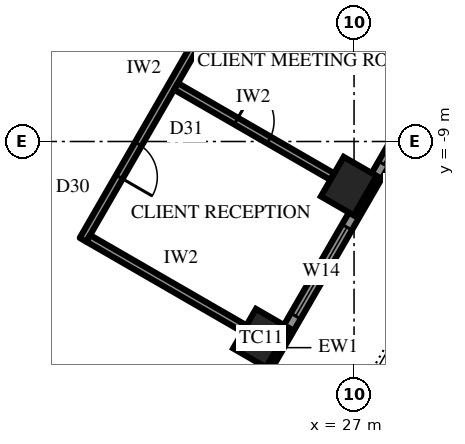
"""IFC4 building model, lengths in metres.
Left out: names, types, materials, properties, quantities, classifications, styles, units other than length and angle.
Written with IfcOpenShell. Run it as: python <this file> out.ifc"""

import sys

from ifc_helpers import new_model, si_unit, direction, frame, frame_2d, origin, origin_2d, place, context, subcontext, project, spatial, rectangle, extrude, element, fill, save


model = new_model("IFC4")
c1 = context("Model", 3, precision=1e-05, world=origin(), true_north=direction((0.0, 1.0)))
c2 = subcontext(c1, "Body", "Model", "MODEL_VIEW")
j1 = project(units=[si_unit("LENGTHUNIT", "METRE"), si_unit("PLANEANGLEUNIT", "RADIAN")], contexts=[c1])
p1 = place(None, origin())
s1 = spatial("IfcSite", under=j1, at=p1, CompositionType="ELEMENT")
p2 = place(p1, origin())
s2 = spatial("IfcBuilding", under=s1, at=p2, CompositionType="ELEMENT")
p3 = place(p2, frame((0.0, 0.0, 265.9)))
s3 = spatial("IfcBuildingStorey", under=s2, at=p3, CompositionType="ELEMENT", Elevation=265.9)
for number, where, z_axis, x_axis in (
    (1, (24.552, -14.175, 0.0), (0.0, 0.0, 1.0), (0.5, 0.866, 0.0)),
    (2, (26.861, -10.175, 0.0), (0.0, 0.0, 1.0), (0.5, 0.866, 0.0)),
):
    element("IfcColumn", number, at=place(p3, frame(where, z_axis=z_axis, x_axis=x_axis)), inside=s3, PredefinedType="COLUMN", context=c2, shape_type="SweptSolid", body=[
        extrude(rectangle(XDim=1.2, YDim=1.0, at=origin_2d()), origin(), (0.0, 0.0, 1.0), 4.2),
    ])
p4 = place(p3, frame((18.707, -25.299, 0.0), z_axis=(0.0, 0.0, 1.0), x_axis=(0.500000442367, 0.866025148383, 0.0)))
e3 = element("IfcWall", 3, at=p4, inside=s3, PredefinedType="SOLIDWALL", context=c2, shape_type="SweptSolid", body=[
    extrude(rectangle(XDim=25.113, YDim=0.3, at=frame_2d((12.556, 0.0))), origin(), (0.0, 0.0, 1.0), 2.8),
])
p5 = place(p4, frame((4.278, 0.0, 0.6)))
e4 = element("IfcOpeningElement", 4, at=p5, cuts=e3, PredefinedType="OPENING", context=c2, shape_type="SweptSolid", body=[
    extrude(rectangle(XDim=2.7, YDim=1.95, at=frame_2d((1.35, 0.975))), frame((0.0, 0.16, 0.0), z_axis=(0.0, -1.0, 0.0), x_axis=(1.0, 0.0, 0.0)), (0.0, 0.0, 1.0), 0.32),
])
p6 = place(p4, frame((9.647, 0.0, 0.0)))
e5 = element("IfcOpeningElement", 5, at=p6, cuts=e3, PredefinedType="OPENING", context=c2, shape_type="SweptSolid", body=[
    extrude(rectangle(XDim=1.2, YDim=2.4, at=frame_2d((0.6, 1.2))), frame((0.0, 0.16, 0.0), z_axis=(0.0, -1.0, 0.0), x_axis=(1.0, 0.0, 0.0)), (0.0, 0.0, 1.0), 0.32),
])
p7 = place(p4, frame((13.516, 0.0, 0.6)))
e6 = element("IfcOpeningElement", 6, at=p7, cuts=e3, PredefinedType="OPENING", context=c2, shape_type="SweptSolid", body=[
    extrude(rectangle(XDim=2.7, YDim=1.95, at=frame_2d((1.35, 0.975))), frame((0.0, 0.16, 0.0), z_axis=(0.0, -1.0, 0.0), x_axis=(1.0, 0.0, 0.0)), (0.0, 0.0, 1.0), 0.32),
])
p8 = place(p4, frame((18.135, 0.0, 0.6)))
e7 = element("IfcOpeningElement", 7, at=p8, cuts=e3, PredefinedType="OPENING", context=c2, shape_type="SweptSolid", body=[
    extrude(rectangle(XDim=2.7, YDim=1.95, at=frame_2d((1.35, 0.975))), frame((0.0, 0.16, 0.0), z_axis=(0.0, -1.0, 0.0), x_axis=(1.0, 0.0, 0.0)), (0.0, 0.0, 1.0), 0.32),
])
p9 = place(p3, frame((19.869, -11.587, 0.0), z_axis=(0.0, 0.0, 1.0), x_axis=(0.499989672313, 0.866031366395, 0.0)))
e8 = element("IfcWall", 8, at=p9, inside=s3, PredefinedType="PARTITIONING", context=c2, shape_type="SweptSolid", body=[
    extrude(rectangle(XDim=9.438, YDim=0.2, at=frame_2d((4.719, 0.0))), origin(), (0.0, 0.0, 1.0), 4.0),
])
p10 = place(p9, frame((1.909, 0.0, 0.0)))
e9 = element("IfcOpeningElement", 9, at=p10, cuts=e8, PredefinedType="OPENING", context=c2, shape_type="SweptSolid", body=[
    extrude(rectangle(XDim=1.0, YDim=2.2, at=frame_2d((0.5, 1.1))), frame((0.0, 0.11, 0.0), z_axis=(0.0, -1.0, 0.0), x_axis=(1.0, 0.0, 0.0)), (0.0, 0.0, 1.0), 0.22),
])
p11 = place(p3, frame((20.005, -11.55, 0.0), z_axis=(0.0, 0.0, 1.0), x_axis=(0.866033238375, -0.499986429846, 0.0)))
e10 = element("IfcWall", 10, at=p11, inside=s3, PredefinedType="PARTITIONING", context=c2, shape_type="SweptSolid", body=[
    extrude(rectangle(XDim=4.75, YDim=0.2, at=frame_2d((2.375, 0.0))), origin(), (0.0, 0.0, 1.0), 3.082),
])
p12 = place(p3, frame((22.315, -7.55, 0.0), z_axis=(0.0, 0.0, 1.0), x_axis=(0.866020389056, -0.500008685663, 0.0)))
e11 = element("IfcWall", 11, at=p12, inside=s3, PredefinedType="PARTITIONING", context=c2, shape_type="SweptSolid", body=[
    extrude(rectangle(XDim=4.75, YDim=0.2, at=frame_2d((2.375, 0.0))), origin(), (0.0, 0.0, 1.0), 3.082),
])
p13 = place(p12, frame((1.825, 0.0, 0.0)))
e12 = element("IfcOpeningElement", 12, at=p13, cuts=e11, PredefinedType="OPENING", context=c2, shape_type="SweptSolid", body=[
    extrude(rectangle(XDim=1.0, YDim=2.2, at=frame_2d((0.5, 1.1))), frame((0.0, 0.11, 0.0), z_axis=(0.0, -1.0, 0.0), x_axis=(1.0, 0.0, 0.0)), (0.0, 0.0, 1.0), 0.22),
])
p14 = place(p7, origin())
e13 = element("IfcWindow", 13, at=p14, inside=s3, PartitioningType="SINGLE_PANEL", PredefinedType="WINDOW", context=c2, shape_type="SweptSolid", body=[
    extrude(rectangle(XDim=2.7, YDim=1.95, at=frame_2d((1.35, 0.975))), frame((0.0, 0.03, 0.0), z_axis=(0.0, -1.0, 0.0), x_axis=(1.0, 0.0, 0.0)), (0.0, 0.0, 1.0), 0.06),
])
fill(e6, e13)
p15 = place(p8, origin())
e14 = element("IfcWindow", 14, at=p15, inside=s3, PartitioningType="SINGLE_PANEL", PredefinedType="WINDOW", context=c2, shape_type="SweptSolid", body=[
    extrude(rectangle(XDim=2.7, YDim=1.95, at=frame_2d((1.35, 0.975))), frame((0.0, 0.03, 0.0), z_axis=(0.0, -1.0, 0.0), x_axis=(1.0, 0.0, 0.0)), (0.0, 0.0, 1.0), 0.06),
])
fill(e7, e14)
p16 = place(p10, frame((1.0, 0.0, 0.0), z_axis=(0.0, 0.0, 1.0), x_axis=(-1.0, 0.0, 0.0)))
e15 = element("IfcDoor", 15, at=p16, inside=s3, OperationType="SINGLE_SWING_LEFT", PredefinedType="DOOR", context=c2, shape_type="SweptSolid", body=[
    extrude(rectangle(XDim=1.0, YDim=2.2, at=frame_2d((0.5, 1.1))), frame((0.0, 0.025, 0.0), z_axis=(0.0, -1.0, 0.0), x_axis=(1.0, 0.0, 0.0)), (0.0, 0.0, 1.0), 0.05),
])
fill(e9, e15)
p17 = place(p13, origin())
e16 = element("IfcDoor", 16, at=p17, inside=s3, OperationType="SINGLE_SWING_RIGHT", PredefinedType="DOOR", context=c2, shape_type="SweptSolid", body=[
    extrude(rectangle(XDim=1.0, YDim=2.2, at=frame_2d((0.5, 1.1))), frame((0.0, 0.025, 0.0), z_axis=(0.0, -1.0, 0.0), x_axis=(1.0, 0.0, 0.0)), (0.0, 0.0, 1.0), 0.05),
])
fill(e12, e16)
save(model, sys.argv[1])
